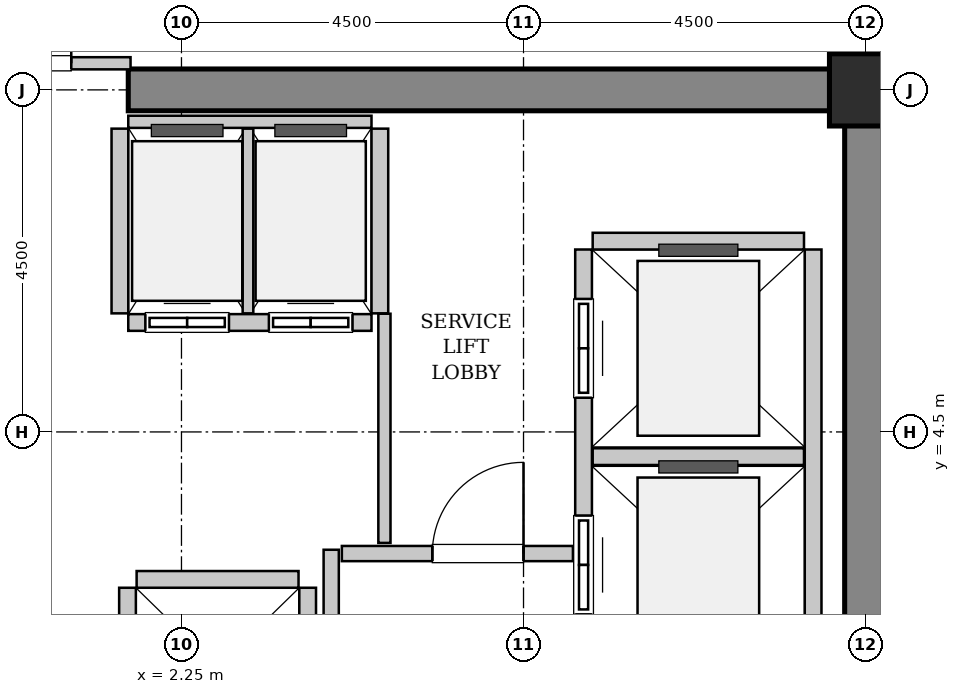
"""IFC4 building model, lengths in metres.
Left out: names, types, materials, properties, quantities, classifications, styles, units other than length and angle.
Written with IfcOpenShell. Run it as: python <this file> out.ifc"""

import sys

from ifc_helpers import new_model, si_unit, direction, frame, frame_2d, origin, origin_2d, place, context, subcontext, project, spatial, rectangle, hollow_rectangle, extrude, source, transform, mapped, element, fill, save


model = new_model("IFC4")
c1 = context("Model", 3, precision=1e-05, world=origin(), true_north=direction((0.0, 1.0)))
c2 = subcontext(c1, "Body", "Model", "MODEL_VIEW")
j1 = project(units=[si_unit("LENGTHUNIT", "METRE"), si_unit("PLANEANGLEUNIT", "RADIAN")], contexts=[c1])
p1 = place(None, origin())
s1 = spatial("IfcSite", under=j1, at=p1, CompositionType="ELEMENT")
p2 = place(p1, origin())
s2 = spatial("IfcBuilding", under=s1, at=p2, CompositionType="ELEMENT")
p3 = place(p2, frame((0.0, 0.0, 117.4)))
s3 = spatial("IfcBuildingStorey", under=s2, at=p3, CompositionType="ELEMENT", Elevation=117.4)
m1 = source(origin(), c2, "Body", "SweptSolid", [
    extrude(rectangle(XDim=9.975, YDim=0.55, at=frame_2d((4.987, 0.0))), origin(), (0.0, 0.0, 1.0), 3.8),
])
p4 = place(p3, frame((1.55, 9.0, 0.0), z_axis=(0.0, 0.0, 1.0), x_axis=(1.0, 0.0, 0.0)))
e1 = element("IfcWall", 1, at=p4, inside=s3, PredefinedType="SHEAR", context=c2, shape_type="MappedRepresentation", body=[
    mapped(m1, transform((0.0, 0.0, 0.0), x_axis=(1.0, 0.0, 0.0), y_axis=(0.0, 1.0, 0.0), z_axis=(0.0, 0.0, 1.0), scale=1.0)),
])
m2 = source(origin(), c2, "Body", "SweptSolid", [
    extrude(rectangle(XDim=7.375, YDim=0.55, at=frame_2d((3.688, 0.0))), origin(), (0.0, 0.0, 1.0), 3.8),
])
p5 = place(p3, frame((11.25, 1.35, 0.0), z_axis=(0.0, 0.0, 1.0), x_axis=(0.0, 1.0, 0.0)))
e2 = element("IfcWall", 2, at=p5, inside=s3, PredefinedType="SHEAR", context=c2, shape_type="MappedRepresentation", body=[
    mapped(m2, transform((0.0, 0.0, 0.0), x_axis=(1.0, 0.0, 0.0), y_axis=(0.0, 1.0, 0.0), z_axis=(0.0, 0.0, 1.0), scale=1.0)),
])
m3 = source(origin(), c2, "Body", "SweptSolid", [
    extrude(hollow_rectangle(XDim=0.95, YDim=0.95, WallThickness=0.045, InnerFilletRadius=0.045, OuterFilletRadius=0.09, at=origin_2d()), origin(), (0.0, 0.0, 1.0), 3.8),
])
p6 = place(p3, frame((11.25, 9.0, 0.0), z_axis=(0.0, 0.0, 1.0), x_axis=(1.0, 0.0, 0.0)))
e3 = element("IfcColumn", 3, at=p6, inside=s3, PredefinedType="COLUMN", context=c2, shape_type="MappedRepresentation", body=[
    mapped(m3, transform((0.0, 0.0, 0.0), x_axis=(1.0, 0.0, 0.0), y_axis=(0.0, 1.0, 0.0), z_axis=(0.0, 0.0, 1.0), scale=1.0)),
])
m4 = source(origin(), c2, "Body", "SweptSolid", [
    extrude(rectangle(XDim=5.45, YDim=0.22, at=frame_2d((2.725, 0.0))), origin(), (0.0, 0.0, 1.0), 3.535),
])
p7 = place(p3, frame((7.54, 6.9, 0.0), z_axis=(0.0, 0.0, 1.0), x_axis=(0.0, -1.0, 0.0)))
e4 = element("IfcWall", 4, at=p7, inside=s3, PredefinedType="SOLIDWALL", context=c2, shape_type="MappedRepresentation", body=[
    mapped(m4, transform((0.0, 0.0, 0.0), x_axis=(1.0, 0.0, 0.0), y_axis=(0.0, 1.0, 0.0), z_axis=(0.0, 0.0, 1.0), scale=1.0)),
])
p8 = place(p7, frame((3.5, 0.0, 0.0)))
e5 = element("IfcOpeningElement", 5, at=p8, cuts=e4, PredefinedType="OPENING", context=c2, shape_type="SweptSolid", body=[
    extrude(rectangle(XDim=1.3, YDim=2.3, at=frame_2d((0.65, 1.15))), frame((0.0, 0.12, 0.0), z_axis=(0.0, -1.0, 0.0), x_axis=(1.0, 0.0, 0.0)), (0.0, 0.0, 1.0), 0.24),
])
p9 = place(p7, frame((0.65, 0.0, 0.0)))
e6 = element("IfcOpeningElement", 6, at=p9, cuts=e4, PredefinedType="OPENING", context=c2, shape_type="SweptSolid", body=[
    extrude(rectangle(XDim=1.3, YDim=2.3, at=frame_2d((0.65, 1.15))), frame((0.0, 0.12, 0.0), z_axis=(0.0, -1.0, 0.0), x_axis=(1.0, 0.0, 0.0)), (0.0, 0.0, 1.0), 0.24),
])
p10 = place(p3, frame((10.56, 1.45, 0.0), z_axis=(0.0, 0.0, 1.0), x_axis=(0.0, 1.0, 0.0)))
e7 = element("IfcWall", 7, at=p10, inside=s3, PredefinedType="SOLIDWALL", context=c2, shape_type="MappedRepresentation", body=[
    mapped(m4, transform((0.0, 0.0, 0.0), x_axis=(1.0, 0.0, 0.0), y_axis=(0.0, 1.0, 0.0), z_axis=(0.0, 0.0, 1.0), scale=1.0)),
])
m5 = source(origin(), c2, "Body", "SweptSolid", [
    extrude(rectangle(XDim=2.78, YDim=0.22, at=frame_2d((1.39, 0.0))), origin(), (0.0, 0.0, 1.0), 3.535),
])
for number, where, z_axis, x_axis in (
    (8, (7.66, 4.175, 0.0), (0.0, 0.0, 1.0), (1.0, 0.0, 0.0)),
    (9, (10.44, 7.01, 0.0), (0.0, 0.0, 1.0), (-1.0, 0.0, 0.0)),
):
    element("IfcWall", number, at=place(p3, frame(where, z_axis=z_axis, x_axis=x_axis)), inside=s3, PredefinedType="SOLIDWALL", context=c2, shape_type="MappedRepresentation", body=[
        mapped(m5, transform((0.0, 0.0, 0.0), x_axis=(1.0, 0.0, 0.0), y_axis=(0.0, 1.0, 0.0), z_axis=(0.0, 0.0, 1.0), scale=1.0)),
    ])
m6 = source(origin(), c2, "Body", "SweptSolid", [
    extrude(rectangle(XDim=3.2, YDim=0.22, at=frame_2d((1.6, 0.0))), origin(), (0.0, 0.0, 1.0), 3.535),
])
p11 = place(p3, frame((1.55, 5.94, 0.0), z_axis=(0.0, 0.0, 1.0), x_axis=(1.0, 0.0, 0.0)))
e10 = element("IfcWall", 10, at=p11, inside=s3, PredefinedType="SOLIDWALL", context=c2, shape_type="MappedRepresentation", body=[
    mapped(m6, transform((0.0, 0.0, 0.0), x_axis=(1.0, 0.0, 0.0), y_axis=(0.0, 1.0, 0.0), z_axis=(0.0, 0.0, 1.0), scale=1.0)),
])
p12 = place(p11, frame((0.225, 0.0, 0.0)))
e11 = element("IfcOpeningElement", 11, at=p12, cuts=e10, PredefinedType="OPENING", context=c2, shape_type="SweptSolid", body=[
    extrude(rectangle(XDim=1.1, YDim=2.2, at=frame_2d((0.55, 1.1))), frame((0.0, 0.12, 0.0), z_axis=(0.0, -1.0, 0.0), x_axis=(1.0, 0.0, 0.0)), (0.0, 0.0, 1.0), 0.24),
])
p13 = place(p11, frame((1.85, 0.0, 0.0)))
e12 = element("IfcOpeningElement", 12, at=p13, cuts=e10, PredefinedType="OPENING", context=c2, shape_type="SweptSolid", body=[
    extrude(rectangle(XDim=1.1, YDim=2.2, at=frame_2d((0.55, 1.1))), frame((0.0, 0.12, 0.0), z_axis=(0.0, -1.0, 0.0), x_axis=(1.0, 0.0, 0.0)), (0.0, 0.0, 1.0), 0.24),
])
m7 = source(origin(), c2, "Body", "SweptSolid", [
    extrude(rectangle(XDim=3.2, YDim=0.16, at=frame_2d((1.6, 0.0))), origin(), (0.0, 0.0, 1.0), 2.425),
])
p14 = place(p3, frame((4.75, 8.58, 0.0), z_axis=(0.0, 0.0, 1.0), x_axis=(-1.0, 0.0, 0.0)))
e13 = element("IfcWall", 13, at=p14, inside=s3, PredefinedType="PARTITIONING", context=c2, shape_type="MappedRepresentation", body=[
    mapped(m7, transform((0.0, 0.0, 0.0), x_axis=(1.0, 0.0, 0.0), y_axis=(0.0, 1.0, 0.0), z_axis=(0.0, 0.0, 1.0), scale=1.0)),
])
m8 = source(origin(), c2, "Body", "SweptSolid", [
    extrude(rectangle(XDim=2.43, YDim=0.22, at=frame_2d((1.215, 0.0))), origin(), (0.0, 0.0, 1.0), 3.535),
])
p15 = place(p3, frame((1.44, 8.49, 0.0), z_axis=(0.0, 0.0, 1.0), x_axis=(0.0, -1.0, 0.0)))
e14 = element("IfcWall", 14, at=p15, inside=s3, PredefinedType="SOLIDWALL", context=c2, shape_type="MappedRepresentation", body=[
    mapped(m8, transform((0.0, 0.0, 0.0), x_axis=(1.0, 0.0, 0.0), y_axis=(0.0, 1.0, 0.0), z_axis=(0.0, 0.0, 1.0), scale=1.0)),
])
m9 = source(origin(), c2, "Body", "SweptSolid", [
    extrude(rectangle(XDim=2.43, YDim=0.14, at=frame_2d((1.215, 0.0))), origin(), (0.0, 0.0, 1.0), 3.535),
])
p16 = place(p3, frame((3.125, 6.06, 0.0), z_axis=(0.0, 0.0, 1.0), x_axis=(0.0, 1.0, 0.0)))
e15 = element("IfcWall", 15, at=p16, inside=s3, PredefinedType="PARTITIONING", context=c2, shape_type="MappedRepresentation", body=[
    mapped(m9, transform((0.0, 0.0, 0.0), x_axis=(1.0, 0.0, 0.0), y_axis=(0.0, 1.0, 0.0), z_axis=(0.0, 0.0, 1.0), scale=1.0)),
])
p17 = place(p3, frame((4.86, 6.06, 0.0), z_axis=(0.0, 0.0, 1.0), x_axis=(0.0, 1.0, 0.0)))
e16 = element("IfcWall", 16, at=p17, inside=s3, PredefinedType="SOLIDWALL", context=c2, shape_type="MappedRepresentation", body=[
    mapped(m8, transform((0.0, 0.0, 0.0), x_axis=(1.0, 0.0, 0.0), y_axis=(0.0, 1.0, 0.0), z_axis=(0.0, 0.0, 1.0), scale=1.0)),
])
m10 = source(origin(), c2, "Body", "SweptSolid", [
    extrude(rectangle(XDim=4.9, YDim=0.22, at=frame_2d((2.45, 0.0))), origin(), (0.0, 0.0, 1.0), 3.535),
])
for number, where, z_axis, x_axis in (
    (17, (1.54, 2.45, 0.0), (0.0, 0.0, 1.0), (0.0, -1.0, 0.0)),
    (18, (3.91, -2.45, 0.0), (0.0, 0.0, 1.0), (0.0, 1.0, 0.0)),
):
    element("IfcWall", number, at=place(p3, frame(where, z_axis=z_axis, x_axis=x_axis)), inside=s3, PredefinedType="SOLIDWALL", context=c2, shape_type="MappedRepresentation", body=[
        mapped(m10, transform((0.0, 0.0, 0.0), x_axis=(1.0, 0.0, 0.0), y_axis=(0.0, 1.0, 0.0), z_axis=(0.0, 0.0, 1.0), scale=1.0)),
    ])
m11 = source(origin(), c2, "Body", "SweptSolid", [
    extrude(rectangle(XDim=2.13, YDim=0.22, at=frame_2d((1.065, 0.0))), origin(), (0.0, 0.0, 1.0), 3.535),
])
p18 = place(p3, frame((3.79, 2.56, 0.0), z_axis=(0.0, 0.0, 1.0), x_axis=(-1.0, 0.0, 0.0)))
e19 = element("IfcWall", 19, at=p18, inside=s3, PredefinedType="SOLIDWALL", context=c2, shape_type="MappedRepresentation", body=[
    mapped(m11, transform((0.0, 0.0, 0.0), x_axis=(1.0, 0.0, 0.0), y_axis=(0.0, 1.0, 0.0), z_axis=(0.0, 0.0, 1.0), scale=1.0)),
])
m12 = source(origin(), c2, "Body", "SweptSolid", [
    extrude(rectangle(XDim=5.9, YDim=0.2, at=frame_2d((2.95, 0.0))), origin(), (0.0, 0.0, 1.0), 3.535),
])
p19 = place(p3, frame((4.22, -2.95, 0.0), z_axis=(0.0, 0.0, 1.0), x_axis=(0.0, 1.0, 0.0)))
e20 = element("IfcWall", 20, at=p19, inside=s3, PredefinedType="PARTITIONING", context=c2, shape_type="MappedRepresentation", body=[
    mapped(m12, transform((0.0, 0.0, 0.0), x_axis=(1.0, 0.0, 0.0), y_axis=(0.0, 1.0, 0.0), z_axis=(0.0, 0.0, 1.0), scale=1.0)),
])
m13 = source(origin(), c2, "Body", "SweptSolid", [
    extrude(rectangle(XDim=3.04, YDim=0.2, at=frame_2d((1.52, 0.0))), origin(), (0.0, 0.0, 1.0), 3.535),
])
p20 = place(p3, frame((4.36, 2.9, 0.0), z_axis=(0.0, 0.0, 1.0), x_axis=(1.0, 0.0, 0.0)))
e21 = element("IfcWall", 21, at=p20, inside=s3, PredefinedType="PARTITIONING", context=c2, shape_type="MappedRepresentation", body=[
    mapped(m13, transform((0.0, 0.0, 0.0), x_axis=(1.0, 0.0, 0.0), y_axis=(0.0, 1.0, 0.0), z_axis=(0.0, 0.0, 1.0), scale=1.0)),
])
p21 = place(p20, frame((1.19, 0.0, 0.0)))
e22 = element("IfcOpeningElement", 22, at=p21, cuts=e21, PredefinedType="OPENING", context=c2, shape_type="SweptSolid", body=[
    extrude(rectangle(XDim=1.2, YDim=2.15, at=frame_2d((0.6, 1.075))), frame((0.0, 0.11, 0.0), z_axis=(0.0, -1.0, 0.0), x_axis=(1.0, 0.0, 0.0)), (0.0, 0.0, 1.0), 0.22),
])
m14 = source(origin(), c2, "Body", "SweptSolid", [
    extrude(rectangle(XDim=3.16, YDim=0.16, at=frame_2d((1.58, 0.0))), origin(), (0.0, 0.0, 1.0), 2.425),
])
p22 = place(p3, frame((-1.58, 9.35, 0.0), z_axis=(0.0, 0.0, 1.0), x_axis=(1.0, 0.0, 0.0)))
e23 = element("IfcWall", 23, at=p22, inside=s3, PredefinedType="PARTITIONING", context=c2, shape_type="MappedRepresentation", body=[
    mapped(m14, transform((0.0, 0.0, 0.0), x_axis=(1.0, 0.0, 0.0), y_axis=(0.0, 1.0, 0.0), z_axis=(0.0, 0.0, 1.0), scale=1.0)),
])
p23 = place(p22, frame((0.78, 0.0, 0.0)))
e24 = element("IfcOpeningElement", 24, at=p23, cuts=e23, PredefinedType="OPENING", context=c2, shape_type="SweptSolid", body=[
    extrude(rectangle(XDim=1.6, YDim=2.3, at=frame_2d((0.8, 1.15))), frame((0.0, 0.09, 0.0), z_axis=(0.0, -1.0, 0.0), x_axis=(1.0, 0.0, 0.0)), (0.0, 0.0, 1.0), 0.18),
])
m15 = source(origin(), c2, "Body", "SweptSolid", [
    extrude(rectangle(XDim=3.015, YDim=0.16, at=frame_2d((1.507, 0.0))), origin(), (0.0, 0.0, 1.0), 3.535),
])
p24 = place(p3, frame((4.92, 3.04, 0.0), z_axis=(0.0, 0.0, 1.0), x_axis=(0.0, 1.0, 0.0)))
e25 = element("IfcWall", 25, at=p24, inside=s3, PredefinedType="PARTITIONING", context=c2, shape_type="MappedRepresentation", body=[
    mapped(m15, transform((0.0, 0.0, 0.0), x_axis=(1.0, 0.0, 0.0), y_axis=(0.0, 1.0, 0.0), z_axis=(0.0, 0.0, 1.0), scale=1.0)),
])
m16 = source(origin(), c2, "Body", "SweptSolid", [
    extrude(rectangle(XDim=1.3, YDim=2.3, at=frame_2d((0.65, 1.15))), frame((0.0, 0.025, 0.0), z_axis=(0.0, -1.0, 0.0), x_axis=(1.0, 0.0, 0.0)), (0.0, 0.0, 1.0), 0.05),
])
p25 = place(p8, origin())
e26 = element("IfcDoor", 26, at=p25, inside=s3, OperationType="SLIDING_TO_RIGHT", PredefinedType="DOOR", context=c2, shape_type="MappedRepresentation", body=[
    mapped(m16, transform((0.0, 0.0, 0.0), x_axis=(1.0, 0.0, 0.0), y_axis=(0.0, 1.0, 0.0), z_axis=(0.0, 0.0, 1.0), scale=1.0)),
])
fill(e5, e26)
p26 = place(p9, origin())
e27 = element("IfcDoor", 27, at=p26, inside=s3, OperationType="SLIDING_TO_RIGHT", PredefinedType="DOOR", context=c2, shape_type="MappedRepresentation", body=[
    mapped(m16, transform((0.0, 0.0, 0.0), x_axis=(1.0, 0.0, 0.0), y_axis=(0.0, 1.0, 0.0), z_axis=(0.0, 0.0, 1.0), scale=1.0)),
])
fill(e6, e27)
m17 = source(origin(), c2, "Body", "SweptSolid", [
    extrude(rectangle(XDim=1.1, YDim=2.2, at=frame_2d((0.55, 1.1))), frame((0.0, 0.025, 0.0), z_axis=(0.0, -1.0, 0.0), x_axis=(1.0, 0.0, 0.0)), (0.0, 0.0, 1.0), 0.05),
])
p27 = place(p12, origin())
e28 = element("IfcDoor", 28, at=p27, inside=s3, OperationType="DOUBLE_DOOR_SLIDING", PredefinedType="DOOR", context=c2, shape_type="MappedRepresentation", body=[
    mapped(m17, transform((0.0, 0.0, 0.0), x_axis=(1.0, 0.0, 0.0), y_axis=(0.0, 1.0, 0.0), z_axis=(0.0, 0.0, 1.0), scale=1.0)),
])
fill(e11, e28)
p28 = place(p13, origin())
e29 = element("IfcDoor", 29, at=p28, inside=s3, OperationType="DOUBLE_DOOR_SLIDING", PredefinedType="DOOR", context=c2, shape_type="MappedRepresentation", body=[
    mapped(m17, transform((0.0, 0.0, 0.0), x_axis=(1.0, 0.0, 0.0), y_axis=(0.0, 1.0, 0.0), z_axis=(0.0, 0.0, 1.0), scale=1.0)),
])
fill(e12, e29)
m18 = source(origin(), c2, "Body", "SweptSolid", [
    extrude(rectangle(XDim=1.2, YDim=2.15, at=frame_2d((0.6, 1.075))), frame((0.0, 0.025, 0.0), z_axis=(0.0, -1.0, 0.0), x_axis=(1.0, 0.0, 0.0)), (0.0, 0.0, 1.0), 0.05),
])
p29 = place(p21, origin())
e30 = element("IfcDoor", 30, at=p29, inside=s3, OperationType="SINGLE_SWING_RIGHT", PredefinedType="DOOR", context=c2, shape_type="MappedRepresentation", body=[
    mapped(m18, transform((0.0, 0.0, 0.0), x_axis=(1.0, 0.0, 0.0), y_axis=(0.0, 1.0, 0.0), z_axis=(0.0, 0.0, 1.0), scale=1.0)),
])
fill(e22, e30)
m19 = source(origin(), c2, "Body", "SweptSolid", [
    extrude(rectangle(XDim=1.6, YDim=2.3, at=frame_2d((0.8, 1.15))), frame((0.0, 0.025, 0.0), z_axis=(0.0, -1.0, 0.0), x_axis=(1.0, 0.0, 0.0)), (0.0, 0.0, 1.0), 0.05),
])
p30 = place(p23, origin())
e31 = element("IfcDoor", 31, at=p30, inside=s3, OperationType="DOUBLE_DOOR_SINGLE_SWING", PredefinedType="DOOR", context=c2, shape_type="MappedRepresentation", body=[
    mapped(m19, transform((0.0, 0.0, 0.0), x_axis=(1.0, 0.0, 0.0), y_axis=(0.0, 1.0, 0.0), z_axis=(0.0, 0.0, 1.0), scale=1.0)),
])
fill(e24, e31)
save(model, sys.argv[1])
